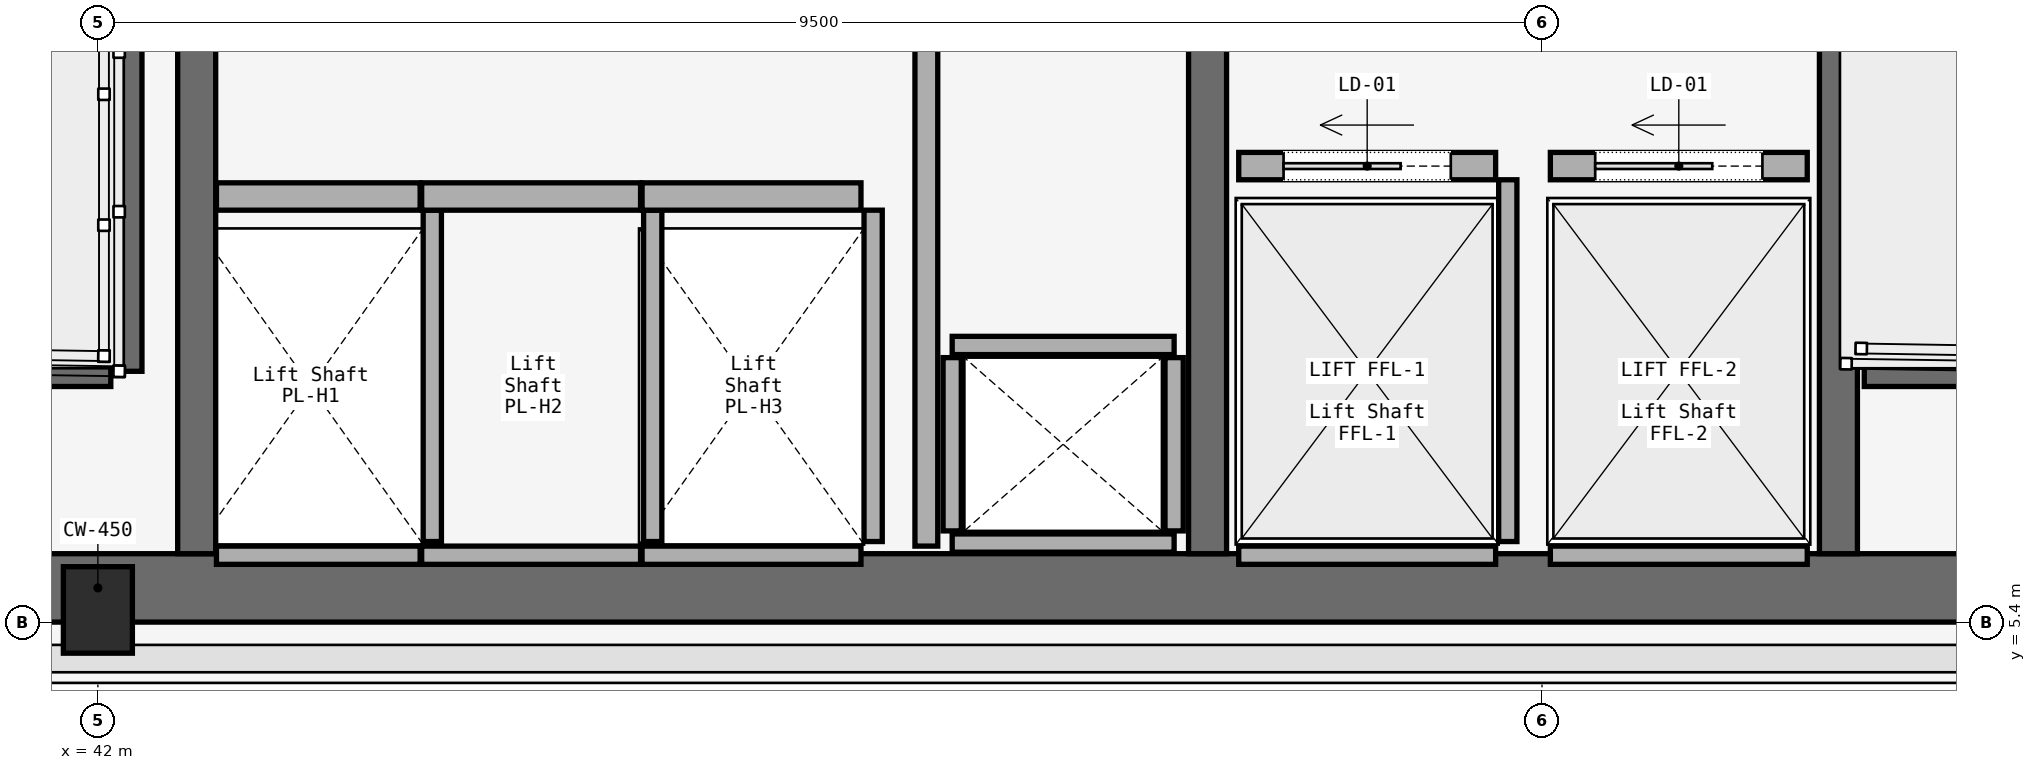
"""IFC4 building model, lengths in metres.
Left out: names, types, materials, properties, quantities, classifications, styles, units other than length and angle.
Written with IfcOpenShell. Run it as: python <this file> out.ifc"""

import sys

from ifc_helpers import new_model, si_unit, direction, frame, frame_2d, origin, origin_2d, place, context, subcontext, project, spatial, rectangle, i_section, extrude, element, fill, save


model = new_model("IFC4")
c1 = context("Model", 3, precision=1e-05, world=origin(), true_north=direction((0.0, 1.0)))
c2 = subcontext(c1, "Body", "Model", "MODEL_VIEW")
j1 = project(units=[si_unit("LENGTHUNIT", "METRE"), si_unit("PLANEANGLEUNIT", "RADIAN")], contexts=[c1])
p1 = place(None, origin())
s1 = spatial("IfcSite", under=j1, at=p1, CompositionType="ELEMENT")
p2 = place(p1, origin())
s2 = spatial("IfcBuilding", under=s1, at=p2, CompositionType="ELEMENT")
p3 = place(p2, frame((0.0, 0.0, 47.4)))
s3 = spatial("IfcBuildingStorey", under=s2, at=p3, CompositionType="ELEMENT", Elevation=47.4)
p4 = place(p3, frame((26.45, 5.625, 0.0), z_axis=(0.0, 0.0, 1.0), x_axis=(1.0, 0.0, 0.0)))
e1 = element("IfcWall", 1, at=p4, inside=s3, PredefinedType="SOLIDWALL", context=c2, shape_type="SweptSolid", body=[
    extrude(rectangle(XDim=31.1, YDim=0.45, at=frame_2d((15.55, 0.0))), origin(), (0.0, 0.0, 1.0), 3.58),
])
for number, where, z_axis, x_axis in (
    (2, (42.65, 5.85, 0.0), (0.0, 0.0, 1.0), (0.0, 1.0, 0.0)),
    (3, (49.3, 5.85, 0.0), (0.0, 0.0, 1.0), (0.0, 1.0, 0.0)),
):
    element("IfcWall", number, at=place(p3, frame(where, z_axis=z_axis, x_axis=x_axis)), inside=s3, PredefinedType="SOLIDWALL", context=c2, shape_type="SweptSolid", body=[
        extrude(rectangle(XDim=8.9, YDim=0.25, at=frame_2d((4.45, 0.0))), origin(), (0.0, 0.0, 1.0), 3.58),
    ])
p5 = place(p3, frame((53.45, 5.85, 0.0), z_axis=(0.0, 0.0, 1.0), x_axis=(0.0, 1.0, 0.0)))
e4 = element("IfcWall", 4, at=p5, inside=s3, PredefinedType="SOLIDWALL", context=c2, shape_type="SweptSolid", body=[
    extrude(rectangle(XDim=8.9, YDim=0.25, at=frame_2d((4.45, 0.0))), origin(), (0.0, 0.0, 1.0), 3.58),
])
p6 = place(p5, frame((7.45, 0.0, 0.0)))
e5 = element("IfcOpeningElement", 5, at=p6, cuts=e4, PredefinedType="OPENING", context=c2, shape_type="SweptSolid", body=[
    extrude(rectangle(XDim=1.1, YDim=2.2, at=frame_2d((0.55, 1.1))), frame((0.0, 0.125, 0.0), z_axis=(0.0, -1.0, 0.0), x_axis=(1.0, 0.0, 0.0)), (0.0, 0.0, 1.0), 0.25),
])
p7 = place(p3, frame((42.0, 5.48, 0.0), z_axis=(0.0, 0.0, 1.0), x_axis=(1.0, 0.0, 0.0)))
e6 = element("IfcColumn", 6, at=p7, inside=s3, PredefinedType="COLUMN", context=c2, shape_type="SweptSolid", body=[
    extrude(i_section(OverallWidth=0.454, OverallDepth=0.569, WebThickness=0.078, FlangeThickness=0.08, FilletRadius=0.015, at=origin_2d()), origin(), (0.0, 0.0, 1.0), 3.58),
])
p8 = place(p3, frame((42.19, 14.7, 0.0), z_axis=(0.0, 0.0, 1.0), x_axis=(0.0, -1.0, 0.0)))
e7 = element("IfcWall", 7, at=p8, inside=s3, PredefinedType="SOLIDWALL", context=c2, shape_type="SweptSolid", body=[
    extrude(rectangle(XDim=7.65, YDim=0.2, at=frame_2d((3.825, 0.0))), origin(), (0.0, 0.0, 1.0), 3.8),
])
for number, where, z_axis, x_axis in (
    (8, (38.97, 7.05, 0.0), (0.0, 0.0, 1.0), (1.0, 0.0, 0.0)),
    (9, (53.62, 7.05, 0.0), (0.0, 0.0, 1.0), (1.0, 0.0, 0.0)),
):
    element("IfcWall", number, at=place(p3, frame(where, z_axis=z_axis, x_axis=x_axis)), inside=s3, PredefinedType="SOLIDWALL", context=c2, shape_type="SweptSolid", body=[
        extrude(rectangle(XDim=3.115, YDim=0.2, at=frame_2d((1.558, 0.0))), origin(), (0.0, 0.0, 1.0), 3.8),
    ])
for number, where, z_axis, x_axis in (
    (10, (47.62, 5.92, 0.0), (0.0, 0.0, 1.0), (1.0, 0.0, 0.0)),
    (11, (47.62, 7.22, 0.0), (0.0, 0.0, 1.0), (1.0, 0.0, 0.0)),
):
    element("IfcWall", number, at=place(p3, frame(where, z_axis=z_axis, x_axis=x_axis)), inside=s3, PredefinedType="SOLIDWALL", context=c2, shape_type="SweptSolid", body=[
        extrude(rectangle(XDim=1.46, YDim=0.12, at=frame_2d((0.73, 0.0))), origin(), (0.0, 0.0, 1.0), 2.933),
    ])
for number, where, z_axis, x_axis in (
    (12, (47.62, 6.0, 0.0), (0.0, 0.0, 1.0), (0.0, 1.0, 0.0)),
    (13, (49.08, 6.0, 0.0), (0.0, 0.0, 1.0), (0.0, 1.0, 0.0)),
):
    element("IfcWall", number, at=place(p3, frame(where, z_axis=z_axis, x_axis=x_axis)), inside=s3, PredefinedType="SOLIDWALL", context=c2, shape_type="SweptSolid", body=[
        extrude(rectangle(XDim=1.14, YDim=0.12, at=frame_2d((0.57, 0.0))), origin(), (0.0, 0.0, 1.0), 2.933),
    ])
p9 = place(p3, frame((47.45, 5.9, 0.0), z_axis=(0.0, 0.0, 1.0), x_axis=(0.0, 1.0, 0.0)))
e14 = element("IfcWall", 14, at=p9, inside=s3, PredefinedType="PARTITIONING", context=c2, shape_type="SweptSolid", body=[
    extrude(rectangle(XDim=8.85, YDim=0.15, at=frame_2d((4.425, 0.0))), origin(), (0.0, 0.0, 1.0), 2.933),
])
p10 = place(p3, frame((42.78, 8.2, 0.0), z_axis=(0.0, 0.0, 1.0), x_axis=(1.0, 0.0, 0.0)))
e15 = element("IfcWall", 15, at=p10, inside=s3, PredefinedType="SOLIDWALL", context=c2, shape_type="SweptSolid", body=[
    extrude(rectangle(XDim=1.34, YDim=0.18, at=frame_2d((0.67, 0.0))), origin(), (0.0, 0.0, 1.0), 2.933),
])
p11 = place(p3, frame((42.78, 5.84, 0.0), z_axis=(0.0, 0.0, 1.0), x_axis=(1.0, 0.0, 0.0)))
e16 = element("IfcWall", 16, at=p11, inside=s3, PredefinedType="SOLIDWALL", context=c2, shape_type="SweptSolid", body=[
    extrude(rectangle(XDim=1.34, YDim=0.12, at=frame_2d((0.67, 0.0))), origin(), (0.0, 0.0, 1.0), 2.933),
])
p12 = place(p3, frame((44.2, 5.93, 0.0), z_axis=(0.0, 0.0, 1.0), x_axis=(0.0, 1.0, 0.0)))
e17 = element("IfcWall", 17, at=p12, inside=s3, PredefinedType="SOLIDWALL", context=c2, shape_type="SweptSolid", body=[
    extrude(rectangle(XDim=2.18, YDim=0.12, at=frame_2d((1.09, 0.0))), origin(), (0.0, 0.0, 1.0), 2.933),
])
p13 = place(p3, frame((44.13, 8.2, 0.0), z_axis=(0.0, 0.0, 1.0), x_axis=(1.0, 0.0, 0.0)))
e18 = element("IfcWall", 18, at=p13, inside=s3, PredefinedType="SOLIDWALL", context=c2, shape_type="SweptSolid", body=[
    extrude(rectangle(XDim=1.44, YDim=0.18, at=frame_2d((0.72, 0.0))), origin(), (0.0, 0.0, 1.0), 2.933),
])
p14 = place(p3, frame((44.13, 5.84, 0.0), z_axis=(0.0, 0.0, 1.0), x_axis=(1.0, 0.0, 0.0)))
e19 = element("IfcWall", 19, at=p14, inside=s3, PredefinedType="SOLIDWALL", context=c2, shape_type="SweptSolid", body=[
    extrude(rectangle(XDim=1.44, YDim=0.12, at=frame_2d((0.72, 0.0))), origin(), (0.0, 0.0, 1.0), 2.933),
])
p15 = place(p3, frame((45.65, 5.93, 0.0), z_axis=(0.0, 0.0, 1.0), x_axis=(0.0, 1.0, 0.0)))
e20 = element("IfcWall", 20, at=p15, inside=s3, PredefinedType="SOLIDWALL", context=c2, shape_type="SweptSolid", body=[
    extrude(rectangle(XDim=2.18, YDim=0.12, at=frame_2d((1.09, 0.0))), origin(), (0.0, 0.0, 1.0), 2.933),
])
p16 = place(p3, frame((45.58, 8.2, 0.0), z_axis=(0.0, 0.0, 1.0), x_axis=(1.0, 0.0, 0.0)))
e21 = element("IfcWall", 21, at=p16, inside=s3, PredefinedType="SOLIDWALL", context=c2, shape_type="SweptSolid", body=[
    extrude(rectangle(XDim=1.44, YDim=0.18, at=frame_2d((0.72, 0.0))), origin(), (0.0, 0.0, 1.0), 2.933),
])
p17 = place(p3, frame((45.58, 5.84, 0.0), z_axis=(0.0, 0.0, 1.0), x_axis=(1.0, 0.0, 0.0)))
e22 = element("IfcWall", 22, at=p17, inside=s3, PredefinedType="SOLIDWALL", context=c2, shape_type="SweptSolid", body=[
    extrude(rectangle(XDim=1.44, YDim=0.12, at=frame_2d((0.72, 0.0))), origin(), (0.0, 0.0, 1.0), 2.933),
])
p18 = place(p3, frame((47.1, 5.93, 0.0), z_axis=(0.0, 0.0, 1.0), x_axis=(0.0, 1.0, 0.0)))
e23 = element("IfcWall", 23, at=p18, inside=s3, PredefinedType="SOLIDWALL", context=c2, shape_type="SweptSolid", body=[
    extrude(rectangle(XDim=2.18, YDim=0.12, at=frame_2d((1.09, 0.0))), origin(), (0.0, 0.0, 1.0), 2.933),
])
p19 = place(p3, frame((49.505, 8.4, 0.0), z_axis=(0.0, 0.0, 1.0), x_axis=(1.0, 0.0, 0.0)))
e24 = element("IfcWall", 24, at=p19, inside=s3, PredefinedType="SOLIDWALL", context=c2, shape_type="SweptSolid", body=[
    extrude(rectangle(XDim=1.69, YDim=0.18, at=frame_2d((0.845, 0.0))), origin(), (0.0, 0.0, 1.0), 2.933),
])
p20 = place(p19, frame((0.295, 0.0, 0.0)))
e25 = element("IfcOpeningElement", 25, at=p20, cuts=e24, PredefinedType="OPENING", context=c2, shape_type="SweptSolid", body=[
    extrude(rectangle(XDim=1.1, YDim=2.2, at=frame_2d((0.55, 1.1))), frame((0.0, 0.09, 0.0), z_axis=(0.0, -1.0, 0.0), x_axis=(1.0, 0.0, 0.0)), (0.0, 0.0, 1.0), 0.18),
])
p21 = place(p3, frame((49.505, 5.84, 0.0), z_axis=(0.0, 0.0, 1.0), x_axis=(1.0, 0.0, 0.0)))
e26 = element("IfcWall", 26, at=p21, inside=s3, PredefinedType="SOLIDWALL", context=c2, shape_type="SweptSolid", body=[
    extrude(rectangle(XDim=1.69, YDim=0.12, at=frame_2d((0.845, 0.0))), origin(), (0.0, 0.0, 1.0), 2.933),
])
p22 = place(p3, frame((51.275, 5.93, 0.0), z_axis=(0.0, 0.0, 1.0), x_axis=(0.0, 1.0, 0.0)))
e27 = element("IfcWall", 27, at=p22, inside=s3, PredefinedType="SOLIDWALL", context=c2, shape_type="SweptSolid", body=[
    extrude(rectangle(XDim=2.38, YDim=0.12, at=frame_2d((1.19, 0.0))), origin(), (0.0, 0.0, 1.0), 2.933),
])
p23 = place(p3, frame((51.555, 8.4, 0.0), z_axis=(0.0, 0.0, 1.0), x_axis=(1.0, 0.0, 0.0)))
e28 = element("IfcWall", 28, at=p23, inside=s3, PredefinedType="SOLIDWALL", context=c2, shape_type="SweptSolid", body=[
    extrude(rectangle(XDim=1.69, YDim=0.18, at=frame_2d((0.845, 0.0))), origin(), (0.0, 0.0, 1.0), 2.933),
])
p24 = place(p23, frame((0.295, 0.0, 0.0)))
e29 = element("IfcOpeningElement", 29, at=p24, cuts=e28, PredefinedType="OPENING", context=c2, shape_type="SweptSolid", body=[
    extrude(rectangle(XDim=1.1, YDim=2.2, at=frame_2d((0.55, 1.1))), frame((0.0, 0.09, 0.0), z_axis=(0.0, -1.0, 0.0), x_axis=(1.0, 0.0, 0.0)), (0.0, 0.0, 1.0), 0.18),
])
p25 = place(p3, frame((51.555, 5.84, 0.0), z_axis=(0.0, 0.0, 1.0), x_axis=(1.0, 0.0, 0.0)))
e30 = element("IfcWall", 30, at=p25, inside=s3, PredefinedType="SOLIDWALL", context=c2, shape_type="SweptSolid", body=[
    extrude(rectangle(XDim=1.69, YDim=0.12, at=frame_2d((0.845, 0.0))), origin(), (0.0, 0.0, 1.0), 2.933),
])
p26 = place(p20, origin())
e31 = element("IfcDoor", 31, at=p26, inside=s3, OperationType="SLIDING_TO_LEFT", PredefinedType="DOOR", context=c2, shape_type="SweptSolid", body=[
    extrude(rectangle(XDim=1.1, YDim=2.2, at=frame_2d((0.55, 1.1))), frame((0.0, 0.025, 0.0), z_axis=(0.0, -1.0, 0.0), x_axis=(1.0, 0.0, 0.0)), (0.0, 0.0, 1.0), 0.05),
])
fill(e25, e31)
p27 = place(p24, origin())
e32 = element("IfcDoor", 32, at=p27, inside=s3, OperationType="SLIDING_TO_LEFT", PredefinedType="DOOR", context=c2, shape_type="SweptSolid", body=[
    extrude(rectangle(XDim=1.1, YDim=2.2, at=frame_2d((0.55, 1.1))), frame((0.0, 0.025, 0.0), z_axis=(0.0, -1.0, 0.0), x_axis=(1.0, 0.0, 0.0)), (0.0, 0.0, 1.0), 0.05),
])
fill(e29, e32)
save(model, sys.argv[1])
